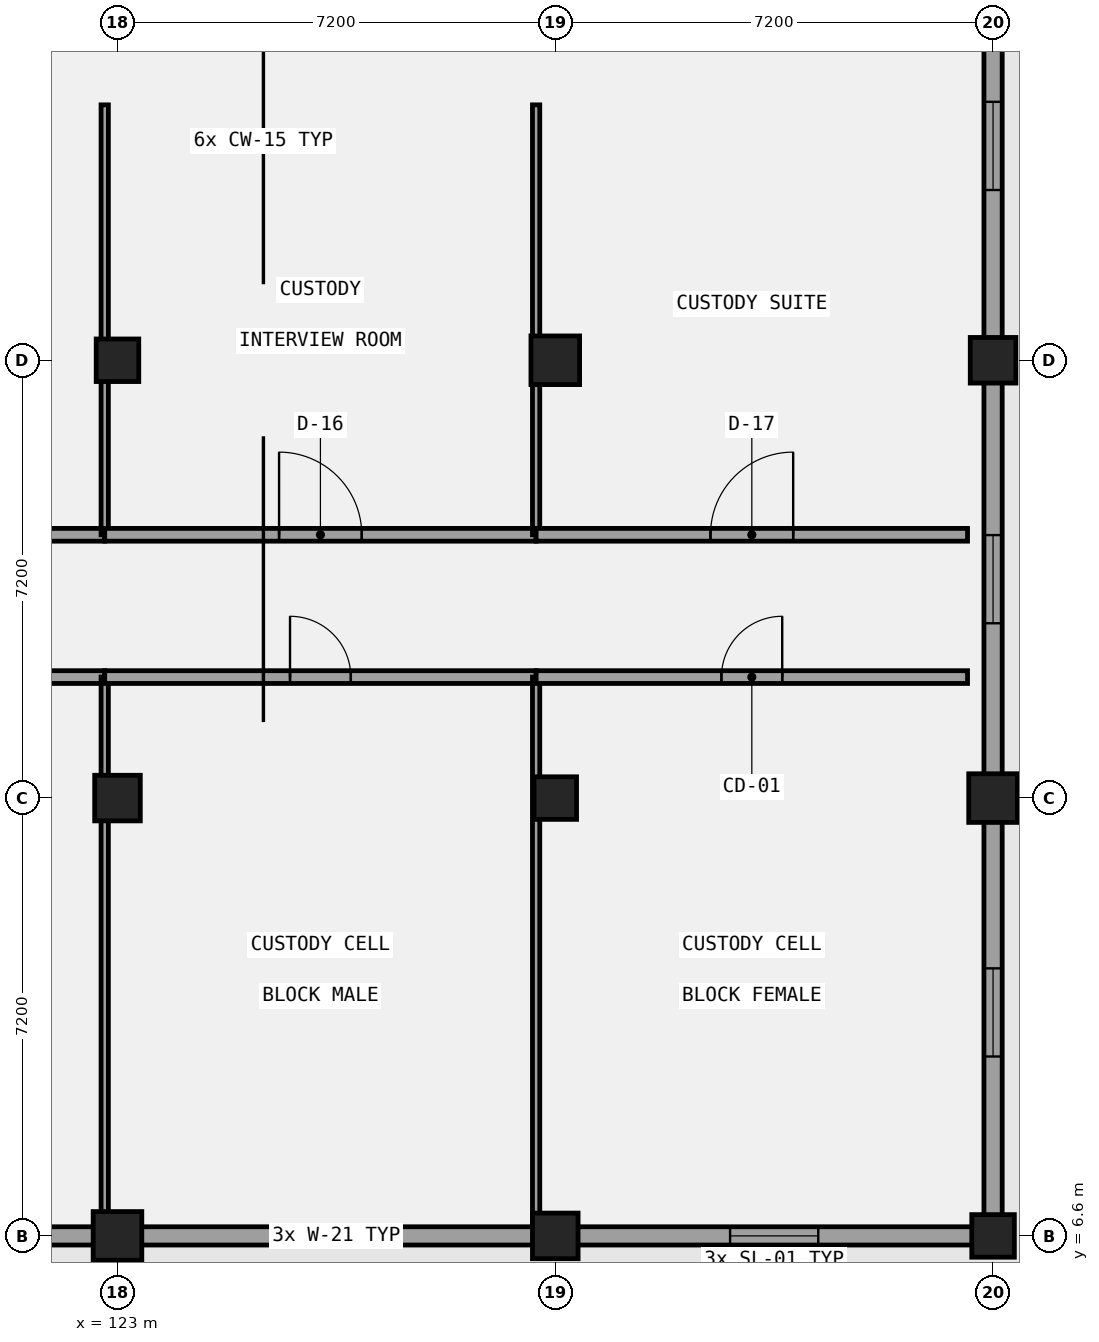
"""IFC4 building model, lengths in metres.
Left out: names, types, materials, properties, quantities, classifications, styles, units other than length and angle.
Written with IfcOpenShell. Run it as: python <this file> out.ifc"""

import sys

from ifc_helpers import new_model, si_unit, direction, frame, frame_2d, origin, origin_2d, place, context, subcontext, project, spatial, rectangle, extrude, element, fill, save


model = new_model("IFC4")
c1 = context("Model", 3, precision=1e-05, world=origin(), true_north=direction((0.0, 1.0)))
c2 = subcontext(c1, "Body", "Model", "MODEL_VIEW")
j1 = project(units=[si_unit("LENGTHUNIT", "METRE"), si_unit("PLANEANGLEUNIT", "RADIAN")], contexts=[c1])
p1 = place(None, origin())
s1 = spatial("IfcSite", under=j1, at=p1, CompositionType="ELEMENT")
p2 = place(p1, origin())
s2 = spatial("IfcBuilding", under=s1, at=p2, CompositionType="ELEMENT")
p3 = place(p2, frame((0.0, 0.0, 5.4)))
s3 = spatial("IfcBuildingStorey", under=s2, at=p3, CompositionType="ELEMENT", Elevation=5.4)
p4 = place(p3, frame((123.0, 6.6, 0.0), z_axis=(0.0, 0.0, 1.0), x_axis=(1.0, 0.0, 0.0)))
e1 = element("IfcColumn", 1, at=p4, inside=s3, PredefinedType="COLUMN", context=c2, shape_type="SweptSolid", body=[
    extrude(rectangle(XDim=0.8, YDim=0.8, at=origin_2d()), origin(), (0.0, 0.0, 1.0), 4.2),
])
p5 = place(p3, frame((123.0, 13.8, 0.0), z_axis=(0.0, 0.0, 1.0), x_axis=(1.0, 0.0, 0.0)))
e2 = element("IfcColumn", 2, at=p5, inside=s3, PredefinedType="COLUMN", context=c2, shape_type="SweptSolid", body=[
    extrude(rectangle(XDim=0.75, YDim=0.75, at=origin_2d()), origin(), (0.0, 0.0, 1.0), 4.2),
])
p6 = place(p3, frame((123.0, 21.0, 0.0), z_axis=(0.0, 0.0, 1.0), x_axis=(1.0, 0.0, 0.0)))
e3 = element("IfcColumn", 3, at=p6, inside=s3, PredefinedType="COLUMN", context=c2, shape_type="SweptSolid", body=[
    extrude(rectangle(XDim=0.7, YDim=0.7, at=origin_2d()), origin(), (0.0, 0.0, 1.0), 4.2),
])
p7 = place(p3, frame((130.2, 6.6, 0.0), z_axis=(0.0, 0.0, 1.0), x_axis=(1.0, 0.0, 0.0)))
e4 = element("IfcColumn", 4, at=p7, inside=s3, PredefinedType="COLUMN", context=c2, shape_type="SweptSolid", body=[
    extrude(rectangle(XDim=0.75, YDim=0.75, at=origin_2d()), origin(), (0.0, 0.0, 1.0), 4.2),
])
p8 = place(p3, frame((130.2, 13.8, 0.0), z_axis=(0.0, 0.0, 1.0), x_axis=(1.0, 0.0, 0.0)))
e5 = element("IfcColumn", 5, at=p8, inside=s3, PredefinedType="COLUMN", context=c2, shape_type="SweptSolid", body=[
    extrude(rectangle(XDim=0.7, YDim=0.7, at=origin_2d()), origin(), (0.0, 0.0, 1.0), 4.2),
])
p9 = place(p3, frame((130.2, 21.0, 0.0), z_axis=(0.0, 0.0, 1.0), x_axis=(1.0, 0.0, 0.0)))
e6 = element("IfcColumn", 6, at=p9, inside=s3, PredefinedType="COLUMN", context=c2, shape_type="SweptSolid", body=[
    extrude(rectangle(XDim=0.8, YDim=0.8, at=origin_2d()), origin(), (0.0, 0.0, 1.0), 4.2),
])
p10 = place(p3, frame((137.4, 6.6, 0.0), z_axis=(0.0, 0.0, 1.0), x_axis=(1.0, 0.0, 0.0)))
e7 = element("IfcColumn", 7, at=p10, inside=s3, PredefinedType="COLUMN", context=c2, shape_type="SweptSolid", body=[
    extrude(rectangle(XDim=0.7, YDim=0.7, at=origin_2d()), origin(), (0.0, 0.0, 1.0), 4.2),
])
p11 = place(p3, frame((137.4, 13.8, 0.0), z_axis=(0.0, 0.0, 1.0), x_axis=(1.0, 0.0, 0.0)))
e8 = element("IfcColumn", 8, at=p11, inside=s3, PredefinedType="COLUMN", context=c2, shape_type="SweptSolid", body=[
    extrude(rectangle(XDim=0.8, YDim=0.8, at=origin_2d()), origin(), (0.0, 0.0, 1.0), 4.2),
])
p12 = place(p3, frame((137.4, 21.0, 0.0), z_axis=(0.0, 0.0, 1.0), x_axis=(1.0, 0.0, 0.0)))
e9 = element("IfcColumn", 9, at=p12, inside=s3, PredefinedType="COLUMN", context=c2, shape_type="SweptSolid", body=[
    extrude(rectangle(XDim=0.75, YDim=0.75, at=origin_2d()), origin(), (0.0, 0.0, 1.0), 4.2),
])
p13 = place(p3, frame((79.65, 6.6, 0.0), z_axis=(0.0, 0.0, 1.0), x_axis=(1.0, 0.0, 0.0)))
e10 = element("IfcWall", 10, at=p13, inside=s3, PredefinedType="SOLIDWALL", context=c2, shape_type="SweptSolid", body=[
    extrude(rectangle(XDim=57.9, YDim=0.3, at=frame_2d((28.95, 0.0))), origin(), (0.0, 0.0, 1.0), 2.92),
])
p14 = place(p13, frame((3.025, 0.0, 1.0)))
e11 = element("IfcOpeningElement", 11, at=p14, cuts=e10, PredefinedType="OPENING", context=c2, shape_type="SweptSolid", body=[
    extrude(rectangle(XDim=1.45, YDim=1.4, at=frame_2d((0.725, 0.7))), frame((0.0, 0.16, 0.0), z_axis=(0.0, -1.0, 0.0), x_axis=(1.0, 0.0, 0.0)), (0.0, 0.0, 1.0), 0.32),
])
p15 = place(p13, frame((10.225, 0.0, 1.0)))
e12 = element("IfcOpeningElement", 12, at=p15, cuts=e10, PredefinedType="OPENING", context=c2, shape_type="SweptSolid", body=[
    extrude(rectangle(XDim=1.45, YDim=1.4, at=frame_2d((0.725, 0.7))), frame((0.0, 0.16, 0.0), z_axis=(0.0, -1.0, 0.0), x_axis=(1.0, 0.0, 0.0)), (0.0, 0.0, 1.0), 0.32),
])
p16 = place(p13, frame((17.425, 0.0, 1.0)))
e13 = element("IfcOpeningElement", 13, at=p16, cuts=e10, PredefinedType="OPENING", context=c2, shape_type="SweptSolid", body=[
    extrude(rectangle(XDim=1.45, YDim=1.4, at=frame_2d((0.725, 0.7))), frame((0.0, 0.16, 0.0), z_axis=(0.0, -1.0, 0.0), x_axis=(1.0, 0.0, 0.0)), (0.0, 0.0, 1.0), 0.32),
])
p17 = place(p13, frame((24.625, 0.0, 1.0)))
e14 = element("IfcOpeningElement", 14, at=p17, cuts=e10, PredefinedType="OPENING", context=c2, shape_type="SweptSolid", body=[
    extrude(rectangle(XDim=1.45, YDim=1.4, at=frame_2d((0.725, 0.7))), frame((0.0, 0.16, 0.0), z_axis=(0.0, -1.0, 0.0), x_axis=(1.0, 0.0, 0.0)), (0.0, 0.0, 1.0), 0.32),
])
p18 = place(p13, frame((31.825, 0.0, 1.0)))
e15 = element("IfcOpeningElement", 15, at=p18, cuts=e10, PredefinedType="OPENING", context=c2, shape_type="SweptSolid", body=[
    extrude(rectangle(XDim=1.45, YDim=1.4, at=frame_2d((0.725, 0.7))), frame((0.0, 0.16, 0.0), z_axis=(0.0, -1.0, 0.0), x_axis=(1.0, 0.0, 0.0)), (0.0, 0.0, 1.0), 0.32),
])
p19 = place(p13, frame((39.025, 0.0, 1.0)))
e16 = element("IfcOpeningElement", 16, at=p19, cuts=e10, PredefinedType="OPENING", context=c2, shape_type="SweptSolid", body=[
    extrude(rectangle(XDim=1.45, YDim=1.4, at=frame_2d((0.725, 0.7))), frame((0.0, 0.16, 0.0), z_axis=(0.0, -1.0, 0.0), x_axis=(1.0, 0.0, 0.0)), (0.0, 0.0, 1.0), 0.32),
])
p20 = place(p13, frame((46.225, 0.0, 1.0)))
e17 = element("IfcOpeningElement", 17, at=p20, cuts=e10, PredefinedType="OPENING", context=c2, shape_type="SweptSolid", body=[
    extrude(rectangle(XDim=1.45, YDim=1.4, at=frame_2d((0.725, 0.7))), frame((0.0, 0.16, 0.0), z_axis=(0.0, -1.0, 0.0), x_axis=(1.0, 0.0, 0.0)), (0.0, 0.0, 1.0), 0.32),
])
p21 = place(p13, frame((53.425, 0.0, 1.0)))
e18 = element("IfcOpeningElement", 18, at=p21, cuts=e10, PredefinedType="OPENING", context=c2, shape_type="SweptSolid", body=[
    extrude(rectangle(XDim=1.45, YDim=1.4, at=frame_2d((0.725, 0.7))), frame((0.0, 0.16, 0.0), z_axis=(0.0, -1.0, 0.0), x_axis=(1.0, 0.0, 0.0)), (0.0, 0.0, 1.0), 0.32),
])
p22 = place(p3, frame((137.4, 6.75, 0.0), z_axis=(0.0, 0.0, 1.0), x_axis=(0.0, 1.0, 0.0)))
e19 = element("IfcWall", 19, at=p22, inside=s3, PredefinedType="SOLIDWALL", context=c2, shape_type="SweptSolid", body=[
    extrude(rectangle(XDim=21.3, YDim=0.3, at=frame_2d((10.65, 0.0))), origin(), (0.0, 0.0, 1.0), 2.92),
])
p23 = place(p22, frame((2.8, 0.0, 1.0)))
e20 = element("IfcOpeningElement", 20, at=p23, cuts=e19, PredefinedType="OPENING", context=c2, shape_type="SweptSolid", body=[
    extrude(rectangle(XDim=1.45, YDim=1.65, at=frame_2d((0.725, 0.825))), frame((0.0, 0.16, 0.0), z_axis=(0.0, -1.0, 0.0), x_axis=(1.0, 0.0, 0.0)), (0.0, 0.0, 1.0), 0.32),
])
p24 = place(p22, frame((9.925, 0.0, 1.0)))
e21 = element("IfcOpeningElement", 21, at=p24, cuts=e19, PredefinedType="OPENING", context=c2, shape_type="SweptSolid", body=[
    extrude(rectangle(XDim=1.45, YDim=1.65, at=frame_2d((0.725, 0.825))), frame((0.0, 0.16, 0.0), z_axis=(0.0, -1.0, 0.0), x_axis=(1.0, 0.0, 0.0)), (0.0, 0.0, 1.0), 0.32),
])
p25 = place(p22, frame((17.05, 0.0, 1.0)))
e22 = element("IfcOpeningElement", 22, at=p25, cuts=e19, PredefinedType="OPENING", context=c2, shape_type="SweptSolid", body=[
    extrude(rectangle(XDim=1.45, YDim=1.65, at=frame_2d((0.725, 0.825))), frame((0.0, 0.16, 0.0), z_axis=(0.0, -1.0, 0.0), x_axis=(1.0, 0.0, 0.0)), (0.0, 0.0, 1.0), 0.32),
])
p26 = place(p3, frame((115.695, 15.79, 0.0), z_axis=(0.0, 0.0, 1.0), x_axis=(1.0, 0.0, 0.0)))
e23 = element("IfcWall", 23, at=p26, inside=s3, PredefinedType="PARTITIONING", context=c2, shape_type="SweptSolid", body=[
    extrude(rectangle(XDim=7.095, YDim=0.21, at=frame_2d((3.547, 0.0))), origin(), (0.0, 0.0, 1.0), 3.37),
])
p27 = place(p26, frame((3.028, 0.0, 0.0)))
e24 = element("IfcOpeningElement", 24, at=p27, cuts=e23, PredefinedType="OPENING", context=c2, shape_type="SweptSolid", body=[
    extrude(rectangle(XDim=1.04, YDim=2.1, at=frame_2d((0.52, 1.05))), frame((0.0, 0.115, 0.0), z_axis=(0.0, -1.0, 0.0), x_axis=(1.0, 0.0, 0.0)), (0.0, 0.0, 1.0), 0.23),
])
p28 = place(p3, frame((122.79, 6.78, 0.0), z_axis=(0.0, 0.0, 1.0), x_axis=(0.0, 1.0, 0.0)))
e25 = element("IfcWall", 25, at=p28, inside=s3, PredefinedType="PARTITIONING", context=c2, shape_type="SweptSolid", body=[
    extrude(rectangle(XDim=9.01, YDim=0.12, at=frame_2d((4.505, 0.0))), origin(), (0.0, 0.0, 1.0), 3.02),
])
p29 = place(p3, frame((122.79, 15.79, 0.0), z_axis=(0.0, 0.0, 1.0), x_axis=(1.0, 0.0, 0.0)))
e26 = element("IfcWall", 26, at=p29, inside=s3, PredefinedType="PARTITIONING", context=c2, shape_type="SweptSolid", body=[
    extrude(rectangle(XDim=7.095, YDim=0.21, at=frame_2d((3.547, 0.0))), origin(), (0.0, 0.0, 1.0), 3.37),
])
p30 = place(p29, frame((3.048, 0.0, 0.0)))
e27 = element("IfcOpeningElement", 27, at=p30, cuts=e26, PredefinedType="OPENING", context=c2, shape_type="SweptSolid", body=[
    extrude(rectangle(XDim=1.0, YDim=2.15, at=frame_2d((0.5, 1.075))), frame((0.0, 0.115, 0.0), z_axis=(0.0, -1.0, 0.0), x_axis=(1.0, 0.0, 0.0)), (0.0, 0.0, 1.0), 0.23),
])
p31 = place(p3, frame((129.885, 6.78, 0.0), z_axis=(0.0, 0.0, 1.0), x_axis=(0.0, 1.0, 0.0)))
e28 = element("IfcWall", 28, at=p31, inside=s3, PredefinedType="PARTITIONING", context=c2, shape_type="SweptSolid", body=[
    extrude(rectangle(XDim=9.01, YDim=0.12, at=frame_2d((4.505, 0.0))), origin(), (0.0, 0.0, 1.0), 2.92),
])
p32 = place(p3, frame((129.885, 15.79, 0.0), z_axis=(0.0, 0.0, 1.0), x_axis=(1.0, 0.0, 0.0)))
e29 = element("IfcWall", 29, at=p32, inside=s3, PredefinedType="PARTITIONING", context=c2, shape_type="SweptSolid", body=[
    extrude(rectangle(XDim=7.095, YDim=0.21, at=frame_2d((3.547, 0.0))), origin(), (0.0, 0.0, 1.0), 3.37),
])
p33 = place(p32, frame((3.048, 0.0, 0.0)))
e30 = element("IfcOpeningElement", 30, at=p33, cuts=e29, PredefinedType="OPENING", context=c2, shape_type="SweptSolid", body=[
    extrude(rectangle(XDim=1.0, YDim=2.15, at=frame_2d((0.5, 1.075))), frame((0.0, 0.115, 0.0), z_axis=(0.0, -1.0, 0.0), x_axis=(1.0, 0.0, 0.0)), (0.0, 0.0, 1.0), 0.23),
])
p34 = place(p3, frame((115.695, 18.13, 0.0), z_axis=(0.0, 0.0, 1.0), x_axis=(1.0, 0.0, 0.0)))
e31 = element("IfcWall", 31, at=p34, inside=s3, PredefinedType="PARTITIONING", context=c2, shape_type="SweptSolid", body=[
    extrude(rectangle(XDim=7.095, YDim=0.21, at=frame_2d((3.547, 0.0))), origin(), (0.0, 0.0, 1.0), 3.92),
])
p35 = place(p34, frame((2.938, 0.0, 0.0)))
e32 = element("IfcOpeningElement", 32, at=p35, cuts=e31, PredefinedType="OPENING", context=c2, shape_type="SweptSolid", body=[
    extrude(rectangle(XDim=1.22, YDim=2.35, at=frame_2d((0.61, 1.175))), frame((0.0, 0.115, 0.0), z_axis=(0.0, -1.0, 0.0), x_axis=(1.0, 0.0, 0.0)), (0.0, 0.0, 1.0), 0.23),
])
p36 = place(p3, frame((122.79, 18.13, 0.0), z_axis=(0.0, 0.0, 1.0), x_axis=(0.0, 1.0, 0.0)))
e33 = element("IfcWall", 33, at=p36, inside=s3, PredefinedType="PARTITIONING", context=c2, shape_type="SweptSolid", body=[
    extrude(rectangle(XDim=7.07, YDim=0.12, at=frame_2d((3.535, 0.0))), origin(), (0.0, 0.0, 1.0), 2.92),
])
p37 = place(p3, frame((122.79, 18.13, 0.0), z_axis=(0.0, 0.0, 1.0), x_axis=(1.0, 0.0, 0.0)))
e34 = element("IfcWall", 34, at=p37, inside=s3, PredefinedType="PARTITIONING", context=c2, shape_type="SweptSolid", body=[
    extrude(rectangle(XDim=7.095, YDim=0.21, at=frame_2d((3.547, 0.0))), origin(), (0.0, 0.0, 1.0), 3.92),
])
p38 = place(p37, frame((2.867, 0.0, 0.0)))
e35 = element("IfcOpeningElement", 35, at=p38, cuts=e34, PredefinedType="OPENING", context=c2, shape_type="SweptSolid", body=[
    extrude(rectangle(XDim=1.36, YDim=2.1, at=frame_2d((0.68, 1.05))), frame((0.0, 0.115, 0.0), z_axis=(0.0, -1.0, 0.0), x_axis=(1.0, 0.0, 0.0)), (0.0, 0.0, 1.0), 0.23),
])
p39 = place(p3, frame((129.885, 18.13, 0.0), z_axis=(0.0, 0.0, 1.0), x_axis=(0.0, 1.0, 0.0)))
e36 = element("IfcWall", 36, at=p39, inside=s3, PredefinedType="PARTITIONING", context=c2, shape_type="SweptSolid", body=[
    extrude(rectangle(XDim=7.07, YDim=0.12, at=frame_2d((3.535, 0.0))), origin(), (0.0, 0.0, 1.0), 2.92),
])
p40 = place(p3, frame((129.885, 18.13, 0.0), z_axis=(0.0, 0.0, 1.0), x_axis=(1.0, 0.0, 0.0)))
e37 = element("IfcWall", 37, at=p40, inside=s3, PredefinedType="PARTITIONING", context=c2, shape_type="SweptSolid", body=[
    extrude(rectangle(XDim=7.095, YDim=0.21, at=frame_2d((3.547, 0.0))), origin(), (0.0, 0.0, 1.0), 3.92),
])
p41 = place(p40, frame((2.867, 0.0, 0.0)))
e38 = element("IfcOpeningElement", 38, at=p41, cuts=e37, PredefinedType="OPENING", context=c2, shape_type="SweptSolid", body=[
    extrude(rectangle(XDim=1.36, YDim=2.22, at=frame_2d((0.68, 1.11))), frame((0.0, 0.115, 0.0), z_axis=(0.0, -1.0, 0.0), x_axis=(1.0, 0.0, 0.0)), (0.0, 0.0, 1.0), 0.23),
])
p42 = place(p20, origin())
e39 = element("IfcWindow", 39, at=p42, inside=s3, PartitioningType="SINGLE_PANEL", PredefinedType="WINDOW", context=c2, shape_type="SweptSolid", body=[
    extrude(rectangle(XDim=1.45, YDim=1.4, at=frame_2d((0.725, 0.7))), frame((0.0, 0.03, 0.0), z_axis=(0.0, -1.0, 0.0), x_axis=(1.0, 0.0, 0.0)), (0.0, 0.0, 1.0), 0.06),
])
fill(e17, e39)
p43 = place(p21, origin())
e40 = element("IfcWindow", 40, at=p43, inside=s3, PartitioningType="SINGLE_PANEL", PredefinedType="WINDOW", context=c2, shape_type="SweptSolid", body=[
    extrude(rectangle(XDim=1.45, YDim=1.4, at=frame_2d((0.725, 0.7))), frame((0.0, 0.03, 0.0), z_axis=(0.0, -1.0, 0.0), x_axis=(1.0, 0.0, 0.0)), (0.0, 0.0, 1.0), 0.06),
])
fill(e18, e40)
p44 = place(p23, origin())
e41 = element("IfcWindow", 41, at=p44, inside=s3, PartitioningType="SINGLE_PANEL", PredefinedType="WINDOW", context=c2, shape_type="SweptSolid", body=[
    extrude(rectangle(XDim=1.45, YDim=1.65, at=frame_2d((0.725, 0.825))), frame((0.0, 0.03, 0.0), z_axis=(0.0, -1.0, 0.0), x_axis=(1.0, 0.0, 0.0)), (0.0, 0.0, 1.0), 0.06),
])
fill(e20, e41)
p45 = place(p24, origin())
e42 = element("IfcWindow", 42, at=p45, inside=s3, PartitioningType="SINGLE_PANEL", PredefinedType="WINDOW", context=c2, shape_type="SweptSolid", body=[
    extrude(rectangle(XDim=1.45, YDim=1.65, at=frame_2d((0.725, 0.825))), frame((0.0, 0.03, 0.0), z_axis=(0.0, -1.0, 0.0), x_axis=(1.0, 0.0, 0.0)), (0.0, 0.0, 1.0), 0.06),
])
fill(e21, e42)
p46 = place(p25, origin())
e43 = element("IfcWindow", 43, at=p46, inside=s3, PartitioningType="SINGLE_PANEL", PredefinedType="WINDOW", context=c2, shape_type="SweptSolid", body=[
    extrude(rectangle(XDim=1.45, YDim=1.65, at=frame_2d((0.725, 0.825))), frame((0.0, 0.03, 0.0), z_axis=(0.0, -1.0, 0.0), x_axis=(1.0, 0.0, 0.0)), (0.0, 0.0, 1.0), 0.06),
])
fill(e22, e43)
p47 = place(p30, frame((1.0, 0.0, 0.0), z_axis=(0.0, 0.0, 1.0), x_axis=(-1.0, 0.0, 0.0)))
e44 = element("IfcDoor", 44, at=p47, inside=s3, OperationType="SINGLE_SWING_LEFT", PredefinedType="DOOR", context=c2, shape_type="SweptSolid", body=[
    extrude(rectangle(XDim=1.0, YDim=2.15, at=frame_2d((0.5, 1.075))), frame((0.0, 0.025, 0.0), z_axis=(0.0, -1.0, 0.0), x_axis=(1.0, 0.0, 0.0)), (0.0, 0.0, 1.0), 0.05),
])
fill(e27, e44)
p48 = place(p33, frame((1.0, 0.0, 0.0), z_axis=(0.0, 0.0, 1.0), x_axis=(-1.0, 0.0, 0.0)))
e45 = element("IfcDoor", 45, at=p48, inside=s3, OperationType="SINGLE_SWING_RIGHT", PredefinedType="DOOR", context=c2, shape_type="SweptSolid", body=[
    extrude(rectangle(XDim=1.0, YDim=2.15, at=frame_2d((0.5, 1.075))), frame((0.0, 0.025, 0.0), z_axis=(0.0, -1.0, 0.0), x_axis=(1.0, 0.0, 0.0)), (0.0, 0.0, 1.0), 0.05),
])
fill(e30, e45)
p49 = place(p38, origin())
e46 = element("IfcDoor", 46, at=p49, inside=s3, OperationType="SINGLE_SWING_LEFT", PredefinedType="DOOR", context=c2, shape_type="SweptSolid", body=[
    extrude(rectangle(XDim=1.36, YDim=2.1, at=frame_2d((0.68, 1.05))), frame((0.0, 0.025, 0.0), z_axis=(0.0, -1.0, 0.0), x_axis=(1.0, 0.0, 0.0)), (0.0, 0.0, 1.0), 0.05),
])
fill(e35, e46)
p50 = place(p41, origin())
e47 = element("IfcDoor", 47, at=p50, inside=s3, OperationType="SINGLE_SWING_RIGHT", PredefinedType="DOOR", context=c2, shape_type="SweptSolid", body=[
    extrude(rectangle(XDim=1.36, YDim=2.22, at=frame_2d((0.68, 1.11))), frame((0.0, 0.025, 0.0), z_axis=(0.0, -1.0, 0.0), x_axis=(1.0, 0.0, 0.0)), (0.0, 0.0, 1.0), 0.05),
])
fill(e38, e47)
save(model, sys.argv[1])
